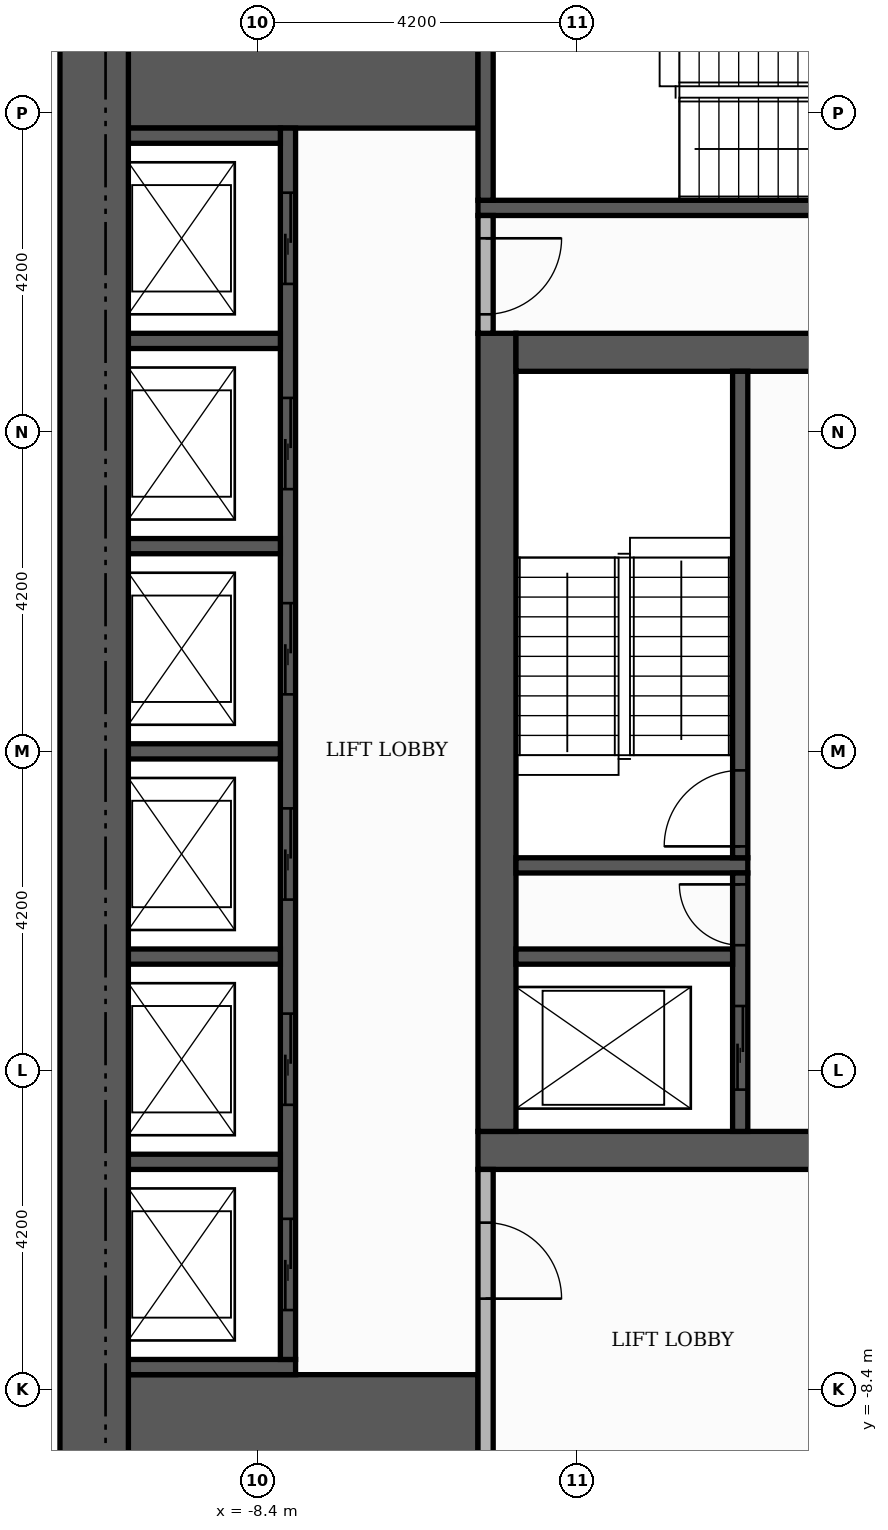
"""IFC4 building model, lengths in metres.
Left out: names, types, materials, properties, quantities, classifications, styles, units other than length and angle.
Written with IfcOpenShell. Run it as: python <this file> out.ifc"""

import sys

from ifc_helpers import new_model, si_unit, direction, frame, frame_2d, origin, place, context, subcontext, project, spatial, rectangle, extrude, element, fill, save


model = new_model("IFC4")
c1 = context("Model", 3, precision=1e-05, world=origin(), true_north=direction((0.0, 1.0)))
c2 = subcontext(c1, "Body", "Model", "MODEL_VIEW")
j1 = project(units=[si_unit("LENGTHUNIT", "METRE"), si_unit("PLANEANGLEUNIT", "RADIAN")], contexts=[c1])
p1 = place(None, origin())
s1 = spatial("IfcSite", under=j1, at=p1, CompositionType="ELEMENT")
p2 = place(p1, origin())
s2 = spatial("IfcBuilding", under=s1, at=p2, CompositionType="ELEMENT")
p3 = place(p2, frame((0.0, 0.0, 106.5)))
s3 = spatial("IfcBuildingStorey", under=s2, at=p3, CompositionType="ELEMENT", Elevation=106.5)
p4 = place(p3, frame((-5.5, -5.25, 0.0), z_axis=(0.0, 0.0, 1.0), x_axis=(1.0, 0.0, 0.0)))
e1 = element("IfcWall", 1, at=p4, inside=s3, PredefinedType="SHEAR", context=c2, shape_type="SweptSolid", body=[
    extrude(rectangle(XDim=11.0, YDim=0.5, at=frame_2d((5.5, 0.0))), origin(), (0.0, 0.0, 1.0), 3.48),
])
p5 = place(p4, frame((4.9, 0.0, 0.0)))
e2 = element("IfcOpeningElement", 2, at=p5, cuts=e1, PredefinedType="OPENING", context=c2, shape_type="SweptSolid", body=[
    extrude(rectangle(XDim=1.2, YDim=2.1, at=frame_2d((0.6, 1.05))), frame((0.0, 0.26, 0.0), z_axis=(0.0, -1.0, 0.0), x_axis=(1.0, 0.0, 0.0)), (0.0, 0.0, 1.0), 0.52),
])
p6 = place(p3, frame((-5.25, -5.0, 0.0), z_axis=(0.0, 0.0, 1.0), x_axis=(0.0, 1.0, 0.0)))
e3 = element("IfcWall", 3, at=p6, inside=s3, PredefinedType="SHEAR", context=c2, shape_type="SweptSolid", body=[
    extrude(rectangle(XDim=10.5, YDim=0.5, at=frame_2d((5.25, 0.0))), origin(), (0.0, 0.0, 1.0), 3.48),
])
p7 = place(p3, frame((-5.0, 5.25, 0.0), z_axis=(0.0, 0.0, 1.0), x_axis=(1.0, 0.0, 0.0)))
e4 = element("IfcWall", 4, at=p7, inside=s3, PredefinedType="SHEAR", context=c2, shape_type="SweptSolid", body=[
    extrude(rectangle(XDim=10.0, YDim=0.5, at=frame_2d((5.0, 0.0))), origin(), (0.0, 0.0, 1.0), 3.48),
])
p8 = place(p7, frame((4.4, 0.0, 0.0)))
e5 = element("IfcOpeningElement", 5, at=p8, cuts=e4, PredefinedType="OPENING", context=c2, shape_type="SweptSolid", body=[
    extrude(rectangle(XDim=1.2, YDim=2.1, at=frame_2d((0.6, 1.05))), frame((0.0, 0.26, 0.0), z_axis=(0.0, -1.0, 0.0), x_axis=(1.0, 0.0, 0.0)), (0.0, 0.0, 1.0), 0.52),
])
for number, where, z_axis, x_axis in (
    (6, (-10.1, -9.15, 0.0), (0.0, 0.0, 1.0), (1.0, 0.0, 0.0)),
    (7, (-10.1, 9.15, 0.0), (0.0, 0.0, 1.0), (1.0, 0.0, 0.0)),
):
    element("IfcWall", number, at=place(p3, frame(where, z_axis=z_axis, x_axis=x_axis)), inside=s3, PredefinedType="SHEAR", context=c2, shape_type="SweptSolid", body=[
        extrude(rectangle(XDim=4.6, YDim=1.9, at=frame_2d((2.3, 0.0))), origin(), (0.0, 0.0, 1.0), 3.48),
    ])
p9 = place(p3, frame((-5.0, -1.5, 0.0), z_axis=(0.0, 0.0, 1.0), x_axis=(1.0, 0.0, 0.0)))
e8 = element("IfcWall", 8, at=p9, inside=s3, PredefinedType="SHEAR", context=c2, shape_type="SweptSolid", body=[
    extrude(rectangle(XDim=3.05, YDim=0.2, at=frame_2d((1.525, 0.0))), origin(), (0.0, 0.0, 1.0), 3.48),
])
p10 = place(p3, frame((-2.05, -1.4, 0.0), z_axis=(0.0, 0.0, 1.0), x_axis=(0.0, 1.0, 0.0)))
e9 = element("IfcWall", 9, at=p10, inside=s3, PredefinedType="SHEAR", context=c2, shape_type="SweptSolid", body=[
    extrude(rectangle(XDim=6.4, YDim=0.2, at=frame_2d((3.2, 0.0))), origin(), (0.0, 0.0, 1.0), 3.48),
])
p11 = place(p10, frame((0.15, 0.0, 0.0)))
e10 = element("IfcOpeningElement", 10, at=p11, cuts=e9, PredefinedType="OPENING", context=c2, shape_type="SweptSolid", body=[
    extrude(rectangle(XDim=1.0, YDim=2.1, at=frame_2d((0.5, 1.05))), frame((0.0, 0.11, 0.0), z_axis=(0.0, -1.0, 0.0), x_axis=(1.0, 0.0, 0.0)), (0.0, 0.0, 1.0), 0.22),
])
p12 = place(p3, frame((-5.5, 7.15, 0.0), z_axis=(0.0, 0.0, 1.0), x_axis=(1.0, 0.0, 0.0)))
e11 = element("IfcWall", 11, at=p12, inside=s3, PredefinedType="SHEAR", context=c2, shape_type="SweptSolid", body=[
    extrude(rectangle(XDim=6.8, YDim=0.2, at=frame_2d((3.4, 0.0))), origin(), (0.0, 0.0, 1.0), 3.48),
])
p13 = place(p3, frame((-5.4, 7.25, 0.0), z_axis=(0.0, 0.0, 1.0), x_axis=(0.0, 1.0, 0.0)))
e12 = element("IfcWall", 12, at=p13, inside=s3, PredefinedType="SHEAR", context=c2, shape_type="SweptSolid", body=[
    extrude(rectangle(XDim=2.85, YDim=0.2, at=frame_2d((1.425, 0.0))), origin(), (0.0, 0.0, 1.0), 3.48),
])
p14 = place(p3, frame((-10.1, -8.1, 0.0), z_axis=(0.0, 0.0, 1.0), x_axis=(1.0, 0.0, 0.0)))
e13 = element("IfcWall", 13, at=p14, inside=s3, PredefinedType="SHEAR", context=c2, shape_type="SweptSolid", body=[
    extrude(rectangle(XDim=2.2, YDim=0.2, at=frame_2d((1.1, 0.0))), origin(), (0.0, 0.0, 1.0), 3.48),
])
p15 = place(p3, frame((-8.0, -8.0, 0.0), z_axis=(0.0, 0.0, 1.0), x_axis=(0.0, 1.0, 0.0)))
e14 = element("IfcWall", 14, at=p15, inside=s3, PredefinedType="SHEAR", context=c2, shape_type="SweptSolid", body=[
    extrude(rectangle(XDim=16.2, YDim=0.2, at=frame_2d((8.1, 0.0))), origin(), (0.0, 0.0, 1.0), 3.48),
])
p16 = place(p15, frame((0.65, 0.0, 0.0)))
e15 = element("IfcOpeningElement", 15, at=p16, cuts=e14, PredefinedType="OPENING", context=c2, shape_type="SweptSolid", body=[
    extrude(rectangle(XDim=1.2, YDim=2.1, at=frame_2d((0.6, 1.05))), frame((0.0, 0.11, 0.0), z_axis=(0.0, -1.0, 0.0), x_axis=(1.0, 0.0, 0.0)), (0.0, 0.0, 1.0), 0.22),
])
p17 = place(p15, frame((3.35, 0.0, 0.0)))
e16 = element("IfcOpeningElement", 16, at=p17, cuts=e14, PredefinedType="OPENING", context=c2, shape_type="SweptSolid", body=[
    extrude(rectangle(XDim=1.2, YDim=2.1, at=frame_2d((0.6, 1.05))), frame((0.0, 0.11, 0.0), z_axis=(0.0, -1.0, 0.0), x_axis=(1.0, 0.0, 0.0)), (0.0, 0.0, 1.0), 0.22),
])
p18 = place(p15, frame((6.05, 0.0, 0.0)))
e17 = element("IfcOpeningElement", 17, at=p18, cuts=e14, PredefinedType="OPENING", context=c2, shape_type="SweptSolid", body=[
    extrude(rectangle(XDim=1.2, YDim=2.1, at=frame_2d((0.6, 1.05))), frame((0.0, 0.11, 0.0), z_axis=(0.0, -1.0, 0.0), x_axis=(1.0, 0.0, 0.0)), (0.0, 0.0, 1.0), 0.22),
])
p19 = place(p15, frame((8.75, 0.0, 0.0)))
e18 = element("IfcOpeningElement", 18, at=p19, cuts=e14, PredefinedType="OPENING", context=c2, shape_type="SweptSolid", body=[
    extrude(rectangle(XDim=1.2, YDim=2.1, at=frame_2d((0.6, 1.05))), frame((0.0, 0.11, 0.0), z_axis=(0.0, -1.0, 0.0), x_axis=(1.0, 0.0, 0.0)), (0.0, 0.0, 1.0), 0.22),
])
p20 = place(p15, frame((11.45, 0.0, 0.0)))
e19 = element("IfcOpeningElement", 19, at=p20, cuts=e14, PredefinedType="OPENING", context=c2, shape_type="SweptSolid", body=[
    extrude(rectangle(XDim=1.2, YDim=2.1, at=frame_2d((0.6, 1.05))), frame((0.0, 0.11, 0.0), z_axis=(0.0, -1.0, 0.0), x_axis=(1.0, 0.0, 0.0)), (0.0, 0.0, 1.0), 0.22),
])
p21 = place(p15, frame((14.15, 0.0, 0.0)))
e20 = element("IfcOpeningElement", 20, at=p21, cuts=e14, PredefinedType="OPENING", context=c2, shape_type="SweptSolid", body=[
    extrude(rectangle(XDim=1.2, YDim=2.1, at=frame_2d((0.6, 1.05))), frame((0.0, 0.11, 0.0), z_axis=(0.0, -1.0, 0.0), x_axis=(1.0, 0.0, 0.0)), (0.0, 0.0, 1.0), 0.22),
])
p22 = place(p3, frame((-10.1, -5.4, 0.0), z_axis=(0.0, 0.0, 1.0), x_axis=(1.0, 0.0, 0.0)))
e21 = element("IfcWall", 21, at=p22, inside=s3, PredefinedType="SHEAR", context=c2, shape_type="SweptSolid", body=[
    extrude(rectangle(XDim=2.0, YDim=0.2, at=frame_2d((1.0, 0.0))), origin(), (0.0, 0.0, 1.0), 3.48),
])
p23 = place(p3, frame((-2.05, -5.0, 0.0), z_axis=(0.0, 0.0, 1.0), x_axis=(0.0, 1.0, 0.0)))
e22 = element("IfcWall", 22, at=p23, inside=s3, PredefinedType="SHEAR", context=c2, shape_type="SweptSolid", body=[
    extrude(rectangle(XDim=3.4, YDim=0.2, at=frame_2d((1.7, 0.0))), origin(), (0.0, 0.0, 1.0), 3.48),
])
p24 = place(p23, frame((0.55, 0.0, 0.0)))
e23 = element("IfcOpeningElement", 23, at=p24, cuts=e22, PredefinedType="OPENING", context=c2, shape_type="SweptSolid", body=[
    extrude(rectangle(XDim=1.1, YDim=2.1, at=frame_2d((0.55, 1.05))), frame((0.0, 0.11, 0.0), z_axis=(0.0, -1.0, 0.0), x_axis=(1.0, 0.0, 0.0)), (0.0, 0.0, 1.0), 0.22),
])
p25 = place(p23, frame((2.45, 0.0, 0.0)))
e24 = element("IfcOpeningElement", 24, at=p25, cuts=e22, PredefinedType="OPENING", context=c2, shape_type="SweptSolid", body=[
    extrude(rectangle(XDim=0.8, YDim=2.1, at=frame_2d((0.4, 1.05))), frame((0.0, 0.11, 0.0), z_axis=(0.0, -1.0, 0.0), x_axis=(1.0, 0.0, 0.0)), (0.0, 0.0, 1.0), 0.22),
])
p26 = place(p3, frame((-10.1, -2.7, 0.0), z_axis=(0.0, 0.0, 1.0), x_axis=(1.0, 0.0, 0.0)))
e25 = element("IfcWall", 25, at=p26, inside=s3, PredefinedType="SHEAR", context=c2, shape_type="SweptSolid", body=[
    extrude(rectangle(XDim=2.0, YDim=0.2, at=frame_2d((1.0, 0.0))), origin(), (0.0, 0.0, 1.0), 3.48),
])
p27 = place(p3, frame((-5.0, -2.7, 0.0), z_axis=(0.0, 0.0, 1.0), x_axis=(1.0, 0.0, 0.0)))
e26 = element("IfcWall", 26, at=p27, inside=s3, PredefinedType="SHEAR", context=c2, shape_type="SweptSolid", body=[
    extrude(rectangle(XDim=2.85, YDim=0.2, at=frame_2d((1.425, 0.0))), origin(), (0.0, 0.0, 1.0), 3.48),
])
for number, where, z_axis, x_axis in (
    (27, (-10.1, 0.0, 0.0), (0.0, 0.0, 1.0), (1.0, 0.0, 0.0)),
    (28, (-10.1, 2.7, 0.0), (0.0, 0.0, 1.0), (1.0, 0.0, 0.0)),
    (29, (-10.1, 5.4, 0.0), (0.0, 0.0, 1.0), (1.0, 0.0, 0.0)),
    (30, (-10.1, 8.1, 0.0), (0.0, 0.0, 1.0), (1.0, 0.0, 0.0)),
):
    element("IfcWall", number, at=place(p3, frame(where, z_axis=z_axis, x_axis=x_axis)), inside=s3, PredefinedType="SHEAR", context=c2, shape_type="SweptSolid", body=[
        extrude(rectangle(XDim=2.0, YDim=0.2, at=frame_2d((1.0, 0.0))), origin(), (0.0, 0.0, 1.0), 3.48),
    ])
p28 = place(p3, frame((-10.55, -10.1, 0.0), z_axis=(0.0, 0.0, 1.0), x_axis=(0.0, 1.0, 0.0)))
e31 = element("IfcWall", 31, at=p28, inside=s3, PredefinedType="SHEAR", context=c2, shape_type="SweptSolid", body=[
    extrude(rectangle(XDim=20.2, YDim=0.9, at=frame_2d((10.1, 0.0))), origin(), (0.0, 0.0, 1.0), 3.48),
])
p29 = place(p3, frame((-5.4, -10.1, 0.0), z_axis=(0.0, 0.0, 1.0), x_axis=(0.0, 1.0, 0.0)))
e32 = element("IfcWall", 32, at=p29, inside=s3, PredefinedType="PARTITIONING", context=c2, shape_type="SweptSolid", body=[
    extrude(rectangle(XDim=4.6, YDim=0.2, at=frame_2d((2.3, 0.0))), origin(), (0.0, 0.0, 1.0), 3.48),
])
p30 = place(p29, frame((2.9, 0.0, 0.0)))
e33 = element("IfcOpeningElement", 33, at=p30, cuts=e32, PredefinedType="OPENING", context=c2, shape_type="SweptSolid", body=[
    extrude(rectangle(XDim=1.0, YDim=2.1, at=frame_2d((0.5, 1.05))), frame((0.0, 0.11, 0.0), z_axis=(0.0, -1.0, 0.0), x_axis=(1.0, 0.0, 0.0)), (0.0, 0.0, 1.0), 0.22),
])
p31 = place(p3, frame((-5.4, 5.5, 0.0), z_axis=(0.0, 0.0, 1.0), x_axis=(0.0, 1.0, 0.0)))
e34 = element("IfcWall", 34, at=p31, inside=s3, PredefinedType="PARTITIONING", context=c2, shape_type="SweptSolid", body=[
    extrude(rectangle(XDim=1.55, YDim=0.2, at=frame_2d((0.775, 0.0))), origin(), (0.0, 0.0, 1.0), 3.48),
])
p32 = place(p31, frame((0.25, 0.0, 0.0)))
e35 = element("IfcOpeningElement", 35, at=p32, cuts=e34, PredefinedType="OPENING", context=c2, shape_type="SweptSolid", body=[
    extrude(rectangle(XDim=1.0, YDim=2.1, at=frame_2d((0.5, 1.05))), frame((0.0, 0.11, 0.0), z_axis=(0.0, -1.0, 0.0), x_axis=(1.0, 0.0, 0.0)), (0.0, 0.0, 1.0), 0.22),
])
p33 = place(p16, origin())
e36 = element("IfcDoor", 36, at=p33, inside=s3, OperationType="SLIDING_TO_LEFT", PredefinedType="DOOR", context=c2, shape_type="SweptSolid", body=[
    extrude(rectangle(XDim=1.2, YDim=2.1, at=frame_2d((0.6, 1.05))), frame((0.0, 0.025, 0.0), z_axis=(0.0, -1.0, 0.0), x_axis=(1.0, 0.0, 0.0)), (0.0, 0.0, 1.0), 0.05),
])
fill(e15, e36)
p34 = place(p17, origin())
e37 = element("IfcDoor", 37, at=p34, inside=s3, OperationType="SLIDING_TO_LEFT", PredefinedType="DOOR", context=c2, shape_type="SweptSolid", body=[
    extrude(rectangle(XDim=1.2, YDim=2.1, at=frame_2d((0.6, 1.05))), frame((0.0, 0.025, 0.0), z_axis=(0.0, -1.0, 0.0), x_axis=(1.0, 0.0, 0.0)), (0.0, 0.0, 1.0), 0.05),
])
fill(e16, e37)
p35 = place(p18, origin())
e38 = element("IfcDoor", 38, at=p35, inside=s3, OperationType="SLIDING_TO_LEFT", PredefinedType="DOOR", context=c2, shape_type="SweptSolid", body=[
    extrude(rectangle(XDim=1.2, YDim=2.1, at=frame_2d((0.6, 1.05))), frame((0.0, 0.025, 0.0), z_axis=(0.0, -1.0, 0.0), x_axis=(1.0, 0.0, 0.0)), (0.0, 0.0, 1.0), 0.05),
])
fill(e17, e38)
p36 = place(p19, origin())
e39 = element("IfcDoor", 39, at=p36, inside=s3, OperationType="SLIDING_TO_LEFT", PredefinedType="DOOR", context=c2, shape_type="SweptSolid", body=[
    extrude(rectangle(XDim=1.2, YDim=2.1, at=frame_2d((0.6, 1.05))), frame((0.0, 0.025, 0.0), z_axis=(0.0, -1.0, 0.0), x_axis=(1.0, 0.0, 0.0)), (0.0, 0.0, 1.0), 0.05),
])
fill(e18, e39)
p37 = place(p20, origin())
e40 = element("IfcDoor", 40, at=p37, inside=s3, OperationType="SLIDING_TO_LEFT", PredefinedType="DOOR", context=c2, shape_type="SweptSolid", body=[
    extrude(rectangle(XDim=1.2, YDim=2.1, at=frame_2d((0.6, 1.05))), frame((0.0, 0.025, 0.0), z_axis=(0.0, -1.0, 0.0), x_axis=(1.0, 0.0, 0.0)), (0.0, 0.0, 1.0), 0.05),
])
fill(e19, e40)
p38 = place(p21, origin())
e41 = element("IfcDoor", 41, at=p38, inside=s3, OperationType="SLIDING_TO_LEFT", PredefinedType="DOOR", context=c2, shape_type="SweptSolid", body=[
    extrude(rectangle(XDim=1.2, YDim=2.1, at=frame_2d((0.6, 1.05))), frame((0.0, 0.025, 0.0), z_axis=(0.0, -1.0, 0.0), x_axis=(1.0, 0.0, 0.0)), (0.0, 0.0, 1.0), 0.05),
])
fill(e20, e41)
p39 = place(p24, origin())
e42 = element("IfcDoor", 42, at=p39, inside=s3, OperationType="SLIDING_TO_LEFT", PredefinedType="DOOR", context=c2, shape_type="SweptSolid", body=[
    extrude(rectangle(XDim=1.1, YDim=2.1, at=frame_2d((0.55, 1.05))), frame((0.0, 0.025, 0.0), z_axis=(0.0, -1.0, 0.0), x_axis=(1.0, 0.0, 0.0)), (0.0, 0.0, 1.0), 0.05),
])
fill(e23, e42)
p40 = place(p11, origin())
e43 = element("IfcDoor", 43, at=p40, inside=s3, OperationType="SINGLE_SWING_LEFT", PredefinedType="DOOR", context=c2, shape_type="SweptSolid", body=[
    extrude(rectangle(XDim=1.0, YDim=2.1, at=frame_2d((0.5, 1.05))), frame((0.0, 0.025, 0.0), z_axis=(0.0, -1.0, 0.0), x_axis=(1.0, 0.0, 0.0)), (0.0, 0.0, 1.0), 0.05),
])
fill(e10, e43)
p41 = place(p25, origin())
e44 = element("IfcDoor", 44, at=p41, inside=s3, OperationType="SINGLE_SWING_RIGHT", PredefinedType="DOOR", context=c2, shape_type="SweptSolid", body=[
    extrude(rectangle(XDim=0.8, YDim=2.1, at=frame_2d((0.4, 1.05))), frame((0.0, 0.025, 0.0), z_axis=(0.0, -1.0, 0.0), x_axis=(1.0, 0.0, 0.0)), (0.0, 0.0, 1.0), 0.05),
])
fill(e24, e44)
p42 = place(p32, frame((1.0, 0.0, 0.0), z_axis=(0.0, 0.0, 1.0), x_axis=(-1.0, 0.0, 0.0)))
e45 = element("IfcDoor", 45, at=p42, inside=s3, OperationType="SINGLE_SWING_RIGHT", PredefinedType="DOOR", context=c2, shape_type="SweptSolid", body=[
    extrude(rectangle(XDim=1.0, YDim=2.1, at=frame_2d((0.5, 1.05))), frame((0.0, 0.025, 0.0), z_axis=(0.0, -1.0, 0.0), x_axis=(1.0, 0.0, 0.0)), (0.0, 0.0, 1.0), 0.05),
])
fill(e35, e45)
p43 = place(p30, frame((1.0, 0.0, 0.0), z_axis=(0.0, 0.0, 1.0), x_axis=(-1.0, 0.0, 0.0)))
e46 = element("IfcDoor", 46, at=p43, inside=s3, OperationType="SINGLE_SWING_LEFT", PredefinedType="DOOR", context=c2, shape_type="SweptSolid", body=[
    extrude(rectangle(XDim=1.0, YDim=2.1, at=frame_2d((0.5, 1.05))), frame((0.0, 0.025, 0.0), z_axis=(0.0, -1.0, 0.0), x_axis=(1.0, 0.0, 0.0)), (0.0, 0.0, 1.0), 0.05),
])
fill(e33, e46)
save(model, sys.argv[1])
